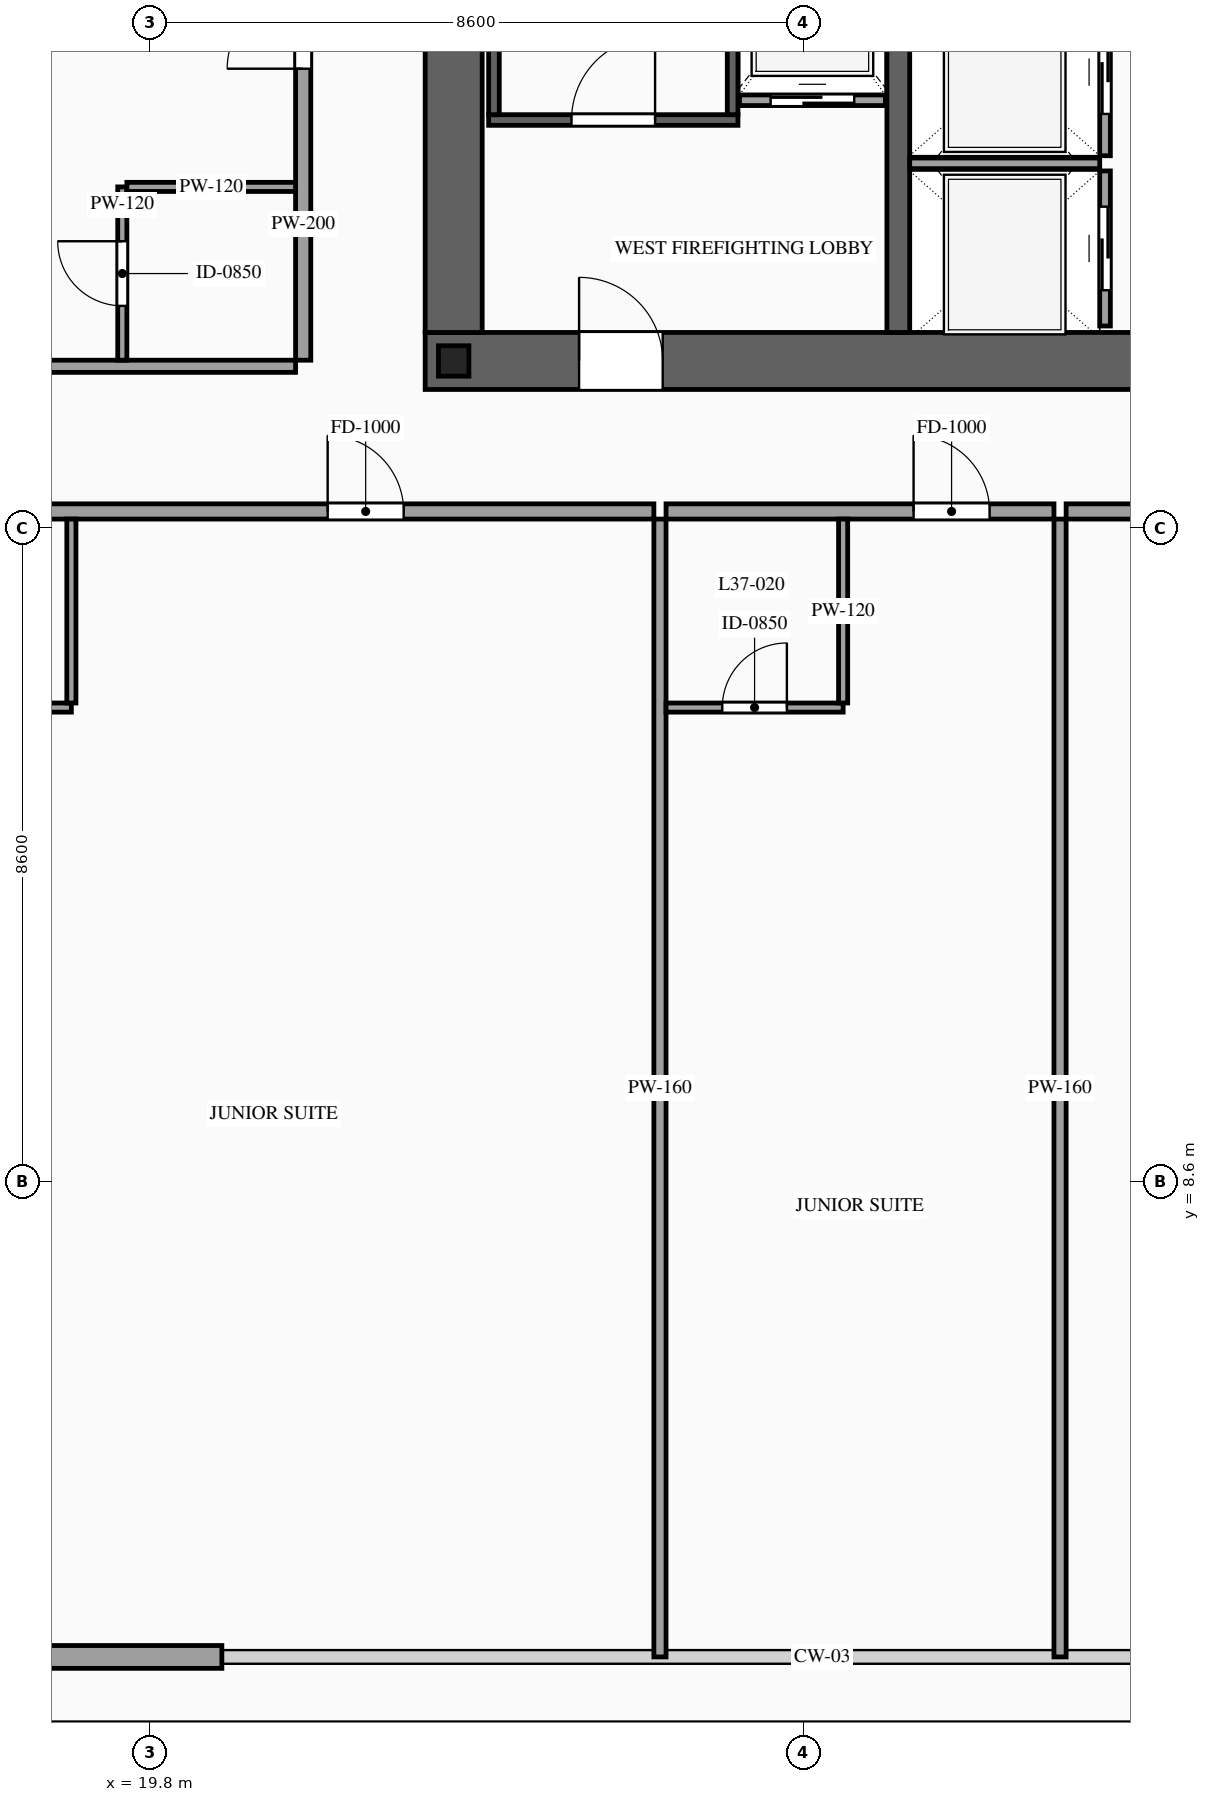
"""IFC4 building model, lengths in metres.
Left out: names, types, materials, properties, quantities, classifications, styles, units other than length and angle.
Written with IfcOpenShell. Run it as: python <this file> out.ifc"""

import sys

from ifc_helpers import new_model, si_unit, direction, frame, frame_2d, origin, origin_2d, place, context, subcontext, project, spatial, rectangle, i_section, extrude, source, transform, mapped, element, fill, save


model = new_model("IFC4")
c1 = context("Model", 3, precision=1e-05, world=origin(), true_north=direction((0.0, 1.0)))
c2 = subcontext(c1, "Body", "Model", "MODEL_VIEW")
j1 = project(units=[si_unit("LENGTHUNIT", "METRE"), si_unit("PLANEANGLEUNIT", "RADIAN")], contexts=[c1])
p1 = place(None, origin())
s1 = spatial("IfcSite", under=j1, at=p1, CompositionType="ELEMENT")
p2 = place(p1, origin())
s2 = spatial("IfcBuilding", under=s1, at=p2, CompositionType="ELEMENT")
p3 = place(p2, frame((0.0, 0.0, 141.6)))
s3 = spatial("IfcBuildingStorey", under=s2, at=p3, CompositionType="ELEMENT", Elevation=141.6)
p4 = place(p3, frame((23.425, 19.4, 0.0), z_axis=(0.0, 0.0, 1.0), x_axis=(1.0, 0.0, 0.0)))
e1 = element("IfcWall", 1, at=p4, inside=s3, PredefinedType="SHEAR", context=c2, shape_type="SweptSolid", body=[
    extrude(rectangle(XDim=27.15, YDim=0.75, at=frame_2d((13.575, 0.0))), origin(), (0.0, 0.0, 1.0), 3.6),
])
p5 = place(p4, frame((2.025, 0.0, 0.0)))
e2 = element("IfcOpeningElement", 2, at=p5, cuts=e1, PredefinedType="OPENING", context=c2, shape_type="SweptSolid", body=[
    extrude(rectangle(XDim=1.1, YDim=2.2, at=frame_2d((0.55, 1.1))), frame((0.0, 0.39, 0.0), z_axis=(0.0, -1.0, 0.0), x_axis=(1.0, 0.0, 0.0)), (0.0, 0.0, 1.0), 0.78),
])
p6 = place(p4, frame((9.925, 0.0, 0.0)))
e3 = element("IfcOpeningElement", 3, at=p6, cuts=e1, PredefinedType="OPENING", context=c2, shape_type="SweptSolid", body=[
    extrude(rectangle(XDim=1.1, YDim=2.2, at=frame_2d((0.55, 1.1))), frame((0.0, 0.39, 0.0), z_axis=(0.0, -1.0, 0.0), x_axis=(1.0, 0.0, 0.0)), (0.0, 0.0, 1.0), 0.78),
])
p7 = place(p4, frame((23.125, 0.0, 0.0)))
e4 = element("IfcOpeningElement", 4, at=p7, cuts=e1, PredefinedType="OPENING", context=c2, shape_type="SweptSolid", body=[
    extrude(rectangle(XDim=1.1, YDim=2.2, at=frame_2d((0.55, 1.1))), frame((0.0, 0.39, 0.0), z_axis=(0.0, -1.0, 0.0), x_axis=(1.0, 0.0, 0.0)), (0.0, 0.0, 1.0), 0.78),
])
p8 = place(p4, frame((19.745, 0.0, 0.0)))
e5 = element("IfcOpeningElement", 5, at=p8, cuts=e1, PredefinedType="OPENING", context=c2, shape_type="SweptSolid", body=[
    extrude(rectangle(XDim=0.9, YDim=2.15, at=frame_2d((0.45, 1.075))), frame((0.0, 0.39, 0.0), z_axis=(0.0, -1.0, 0.0), x_axis=(1.0, 0.0, 0.0)), (0.0, 0.0, 1.0), 0.78),
])
p9 = place(p4, frame((18.305, 0.0, 0.0)))
e6 = element("IfcOpeningElement", 6, at=p9, cuts=e1, PredefinedType="OPENING", context=c2, shape_type="SweptSolid", body=[
    extrude(rectangle(XDim=0.9, YDim=2.15, at=frame_2d((0.45, 1.075))), frame((0.0, 0.39, 0.0), z_axis=(0.0, -1.0, 0.0), x_axis=(1.0, 0.0, 0.0)), (0.0, 0.0, 1.0), 0.78),
])
m1 = source(origin(), c2, "Body", "SweptSolid", [
    extrude(rectangle(XDim=12.05, YDim=0.75, at=frame_2d((6.025, 0.0))), origin(), (0.0, 0.0, 1.0), 3.6),
])
p10 = place(p3, frame((23.8, 19.775, 0.0), z_axis=(0.0, 0.0, 1.0), x_axis=(0.0, 1.0, 0.0)))
e7 = element("IfcWall", 7, at=p10, inside=s3, PredefinedType="SHEAR", context=c2, shape_type="MappedRepresentation", body=[
    mapped(m1, transform((0.0, 0.0, 0.0), scale=1.0)),
])
m2 = source(origin(), c2, "Body", "SweptSolid", [
    extrude(rectangle(XDim=12.05, YDim=0.3, at=frame_2d((6.025, 0.0))), origin(), (0.0, 0.0, 1.0), 3.6),
])
p11 = place(p3, frame((29.65, 19.775, 0.0), z_axis=(0.0, 0.0, 1.0), x_axis=(0.0, 1.0, 0.0)))
e8 = element("IfcWall", 8, at=p11, inside=s3, PredefinedType="SOLIDWALL", context=c2, shape_type="MappedRepresentation", body=[
    mapped(m2, transform((0.0, 0.0, 0.0), scale=1.0)),
])
m3 = source(origin(), c2, "Body", "SweptSolid", [
    extrude(i_section(OverallWidth=0.4, OverallDepth=0.4, WebThickness=0.013, FlangeThickness=0.021, at=origin_2d()), origin(), (0.0, 0.0, 1.0), 3.6),
])
p12 = place(p3, frame((23.8, 19.4, 0.0), z_axis=(0.0, 0.0, 1.0), x_axis=(1.0, 0.0, 0.0)))
e9 = element("IfcColumn", 9, at=p12, inside=s3, PredefinedType="COLUMN", context=c2, shape_type="MappedRepresentation", body=[
    mapped(m3, transform((0.0, 0.0, 0.0), scale=1.0)),
])
m4 = source(origin(), c2, "Body", "SweptSolid", [
    extrude(rectangle(XDim=2.95, YDim=0.3, at=frame_2d((1.475, 0.0))), origin(), (0.0, 0.0, 1.0), 2.775),
])
p13 = place(p3, frame((17.8, 2.35, 0.0), z_axis=(0.0, 0.0, 1.0), x_axis=(1.0, 0.0, 0.0)))
e10 = element("IfcWall", 10, at=p13, inside=s3, PredefinedType="SOLIDWALL", context=c2, shape_type="MappedRepresentation", body=[
    mapped(m4, transform((0.0, 0.0, 0.0), scale=1.0)),
])
p14 = place(p3, frame((27.56, 22.83, 0.0), z_axis=(0.0, 0.0, 1.0), x_axis=(1.0, 0.0, 0.0)))
e11 = element("IfcWall", 11, at=p14, inside=s3, PredefinedType="SOLIDWALL", context=c2, shape_type="SweptSolid", body=[
    extrude(rectangle(XDim=1.92, YDim=0.14, at=frame_2d((0.96, 0.0))), origin(), (0.0, 0.0, 1.0), 3.38),
])
p15 = place(p14, frame((0.41, 0.0, 0.0)))
e12 = element("IfcOpeningElement", 12, at=p15, cuts=e11, PredefinedType="OPENING", context=c2, shape_type="SweptSolid", body=[
    extrude(rectangle(XDim=1.1, YDim=2.2, at=frame_2d((0.55, 1.1))), frame((0.0, 0.085, 0.0), z_axis=(0.0, -1.0, 0.0), x_axis=(1.0, 0.0, 0.0)), (0.0, 0.0, 1.0), 0.17),
])
p16 = place(p3, frame((32.37, 19.86, 0.0), z_axis=(0.0, 0.0, 1.0), x_axis=(0.0, 1.0, 0.0)))
e13 = element("IfcWall", 13, at=p16, inside=s3, PredefinedType="SOLIDWALL", context=c2, shape_type="SweptSolid", body=[
    extrude(rectangle(XDim=2.04, YDim=0.14, at=frame_2d((1.02, 0.0))), origin(), (0.0, 0.0, 1.0), 3.38),
])
p17 = place(p16, frame((0.47, 0.0, 0.0)))
e14 = element("IfcOpeningElement", 14, at=p17, cuts=e13, PredefinedType="OPENING", context=c2, shape_type="SweptSolid", body=[
    extrude(rectangle(XDim=1.1, YDim=2.2, at=frame_2d((0.55, 1.1))), frame((0.0, 0.085, 0.0), z_axis=(0.0, -1.0, 0.0), x_axis=(1.0, 0.0, 0.0)), (0.0, 0.0, 1.0), 0.17),
])
m5 = source(origin(), c2, "Body", "SweptSolid", [
    extrude(rectangle(XDim=2.5, YDim=0.14, at=frame_2d((1.25, 0.0))), origin(), (0.0, 0.0, 1.0), 3.38),
])
p18 = place(p3, frame((29.8, 22.0, 0.0), z_axis=(0.0, 0.0, 1.0), x_axis=(1.0, 0.0, 0.0)))
e15 = element("IfcWall", 15, at=p18, inside=s3, PredefinedType="SOLIDWALL", context=c2, shape_type="MappedRepresentation", body=[
    mapped(m5, transform((0.0, 0.0, 0.0), scale=1.0)),
])
p19 = place(p3, frame((32.37, 22.1, 0.0), z_axis=(0.0, 0.0, 1.0), x_axis=(0.0, 1.0, 0.0)))
e16 = element("IfcWall", 16, at=p19, inside=s3, PredefinedType="SOLIDWALL", context=c2, shape_type="SweptSolid", body=[
    extrude(rectangle(XDim=2.2, YDim=0.14, at=frame_2d((1.1, 0.0))), origin(), (0.0, 0.0, 1.0), 3.38),
])
p20 = place(p19, frame((0.55, 0.0, 0.0)))
e17 = element("IfcOpeningElement", 17, at=p20, cuts=e16, PredefinedType="OPENING", context=c2, shape_type="SweptSolid", body=[
    extrude(rectangle(XDim=1.1, YDim=2.2, at=frame_2d((0.55, 1.1))), frame((0.0, 0.085, 0.0), z_axis=(0.0, -1.0, 0.0), x_axis=(1.0, 0.0, 0.0)), (0.0, 0.0, 1.0), 0.17),
])
p21 = place(p3, frame((24.26, 22.57, 0.0), z_axis=(0.0, 0.0, 1.0), x_axis=(1.0, 0.0, 0.0)))
e18 = element("IfcWall", 18, at=p21, inside=s3, PredefinedType="SOLIDWALL", context=c2, shape_type="SweptSolid", body=[
    extrude(rectangle(XDim=3.28, YDim=0.14, at=frame_2d((1.64, 0.0))), origin(), (0.0, 0.0, 1.0), 3.38),
])
p22 = place(p21, frame((1.09, 0.0, 0.0)))
e19 = element("IfcOpeningElement", 19, at=p22, cuts=e18, PredefinedType="OPENING", context=c2, shape_type="SweptSolid", body=[
    extrude(rectangle(XDim=1.1, YDim=2.2, at=frame_2d((0.55, 1.1))), frame((0.0, 0.085, 0.0), z_axis=(0.0, -1.0, 0.0), x_axis=(1.0, 0.0, 0.0)), (0.0, 0.0, 1.0), 0.17),
])
m6 = source(origin(), c2, "Body", "SweptSolid", [
    extrude(rectangle(XDim=8.94, YDim=0.14, at=frame_2d((4.47, 0.0))), origin(), (0.0, 0.0, 1.0), 3.38),
])
for number, where, z_axis, x_axis in (
    (20, (24.33, 22.64, 0.0), (0.0, 0.0, 1.0), (0.0, 1.0, 0.0)),
    (21, (27.47, 22.64, 0.0), (0.0, 0.0, 1.0), (0.0, 1.0, 0.0)),
):
    element("IfcWall", number, at=place(p3, frame(where, z_axis=z_axis, x_axis=x_axis)), inside=s3, PredefinedType="SOLIDWALL", context=c2, shape_type="MappedRepresentation", body=[
        mapped(m6, transform((0.0, 0.0, 0.0), scale=1.0)),
    ])
p23 = place(p3, frame((16.44, 17.42, 0.0), z_axis=(0.0, 0.0, 1.0), x_axis=(1.0, 0.0, 0.0)))
e22 = element("IfcWall", 22, at=p23, inside=s3, PredefinedType="PARTITIONING", context=c2, shape_type="SweptSolid", body=[
    extrude(rectangle(XDim=9.994, YDim=0.2, at=frame_2d((4.997, 0.0))), origin(), (0.0, 0.0, 1.0), 3.38),
])
p24 = place(p23, frame((5.702, 0.0, 0.0)))
e23 = element("IfcOpeningElement", 23, at=p24, cuts=e22, PredefinedType="OPENING", context=c2, shape_type="SweptSolid", body=[
    extrude(rectangle(XDim=1.0, YDim=2.2, at=frame_2d((0.5, 1.1))), frame((0.0, 0.115, 0.0), z_axis=(0.0, -1.0, 0.0), x_axis=(1.0, 0.0, 0.0)), (0.0, 0.0, 1.0), 0.23),
])
m7 = source(origin(), c2, "Body", "SweptSolid", [
    extrude(rectangle(XDim=14.97, YDim=0.16, at=frame_2d((7.485, 0.0))), origin(), (0.0, 0.0, 1.0), 3.38),
])
p25 = place(p3, frame((26.514, 2.35, 0.0), z_axis=(0.0, 0.0, 1.0), x_axis=(0.0, 1.0, 0.0)))
e24 = element("IfcWall", 24, at=p25, inside=s3, PredefinedType="PARTITIONING", context=c2, shape_type="MappedRepresentation", body=[
    mapped(m7, transform((0.0, 0.0, 0.0), scale=1.0)),
])
p26 = place(p3, frame((16.44, 14.84, 0.0), z_axis=(0.0, 0.0, 1.0), x_axis=(1.0, 0.0, 0.0)))
e25 = element("IfcWall", 25, at=p26, inside=s3, PredefinedType="PARTITIONING", context=c2, shape_type="SweptSolid", body=[
    extrude(rectangle(XDim=2.33, YDim=0.12, at=frame_2d((1.165, 0.0))), origin(), (0.0, 0.0, 1.0), 3.38),
])
p27 = place(p26, frame((0.74, 0.0, 0.0)))
e26 = element("IfcOpeningElement", 26, at=p27, cuts=e25, PredefinedType="OPENING", context=c2, shape_type="SweptSolid", body=[
    extrude(rectangle(XDim=0.85, YDim=2.1, at=frame_2d((0.425, 1.05))), frame((0.0, 0.075, 0.0), z_axis=(0.0, -1.0, 0.0), x_axis=(1.0, 0.0, 0.0)), (0.0, 0.0, 1.0), 0.15),
])
m8 = source(origin(), c2, "Body", "SweptSolid", [
    extrude(rectangle(XDim=2.42, YDim=0.12, at=frame_2d((1.21, 0.0))), origin(), (0.0, 0.0, 1.0), 3.38),
])
p28 = place(p3, frame((18.77, 14.9, 0.0), z_axis=(0.0, 0.0, 1.0), x_axis=(0.0, 1.0, 0.0)))
e27 = element("IfcWall", 27, at=p28, inside=s3, PredefinedType="PARTITIONING", context=c2, shape_type="MappedRepresentation", body=[
    mapped(m8, transform((0.0, 0.0, 0.0), scale=1.0)),
])
p29 = place(p3, frame((26.594, 17.42, 0.0), z_axis=(0.0, 0.0, 1.0), x_axis=(1.0, 0.0, 0.0)))
e28 = element("IfcWall", 28, at=p29, inside=s3, PredefinedType="PARTITIONING", context=c2, shape_type="SweptSolid", body=[
    extrude(rectangle(XDim=5.104, YDim=0.2, at=frame_2d((2.552, 0.0))), origin(), (0.0, 0.0, 1.0), 3.38),
])
p30 = place(p29, frame((3.257, 0.0, 0.0)))
e29 = element("IfcOpeningElement", 29, at=p30, cuts=e28, PredefinedType="OPENING", context=c2, shape_type="SweptSolid", body=[
    extrude(rectangle(XDim=1.0, YDim=2.2, at=frame_2d((0.5, 1.1))), frame((0.0, 0.115, 0.0), z_axis=(0.0, -1.0, 0.0), x_axis=(1.0, 0.0, 0.0)), (0.0, 0.0, 1.0), 0.23),
])
p31 = place(p3, frame((31.778, 2.35, 0.0), z_axis=(0.0, 0.0, 1.0), x_axis=(0.0, 1.0, 0.0)))
e30 = element("IfcWall", 30, at=p31, inside=s3, PredefinedType="PARTITIONING", context=c2, shape_type="MappedRepresentation", body=[
    mapped(m7, transform((0.0, 0.0, 0.0), scale=1.0)),
])
p32 = place(p3, frame((26.594, 14.84, 0.0), z_axis=(0.0, 0.0, 1.0), x_axis=(1.0, 0.0, 0.0)))
e31 = element("IfcWall", 31, at=p32, inside=s3, PredefinedType="PARTITIONING", context=c2, shape_type="SweptSolid", body=[
    extrude(rectangle(XDim=2.33, YDim=0.12, at=frame_2d((1.165, 0.0))), origin(), (0.0, 0.0, 1.0), 3.38),
])
p33 = place(p32, frame((0.74, 0.0, 0.0)))
e32 = element("IfcOpeningElement", 32, at=p33, cuts=e31, PredefinedType="OPENING", context=c2, shape_type="SweptSolid", body=[
    extrude(rectangle(XDim=0.85, YDim=2.1, at=frame_2d((0.425, 1.05))), frame((0.0, 0.075, 0.0), z_axis=(0.0, -1.0, 0.0), x_axis=(1.0, 0.0, 0.0)), (0.0, 0.0, 1.0), 0.15),
])
p34 = place(p3, frame((28.924, 14.9, 0.0), z_axis=(0.0, 0.0, 1.0), x_axis=(0.0, 1.0, 0.0)))
e33 = element("IfcWall", 33, at=p34, inside=s3, PredefinedType="PARTITIONING", context=c2, shape_type="MappedRepresentation", body=[
    mapped(m8, transform((0.0, 0.0, 0.0), scale=1.0)),
])
p35 = place(p3, frame((31.858, 17.42, 0.0), z_axis=(0.0, 0.0, 1.0), x_axis=(1.0, 0.0, 0.0)))
e34 = element("IfcWall", 34, at=p35, inside=s3, PredefinedType="PARTITIONING", context=c2, shape_type="SweptSolid", body=[
    extrude(rectangle(XDim=11.024, YDim=0.2, at=frame_2d((5.512, 0.0))), origin(), (0.0, 0.0, 1.0), 3.38),
])
p36 = place(p35, frame((5.012, 0.0, 0.0)))
e35 = element("IfcOpeningElement", 35, at=p36, cuts=e34, PredefinedType="OPENING", context=c2, shape_type="SweptSolid", body=[
    extrude(rectangle(XDim=1.0, YDim=2.2, at=frame_2d((0.5, 1.1))), frame((0.0, 0.115, 0.0), z_axis=(0.0, -1.0, 0.0), x_axis=(1.0, 0.0, 0.0)), (0.0, 0.0, 1.0), 0.23),
])
p37 = place(p3, frame((21.82, 19.41, 0.0), z_axis=(0.0, 0.0, 1.0), x_axis=(0.0, 1.0, 0.0)))
e36 = element("IfcWall", 36, at=p37, inside=s3, PredefinedType="PARTITIONING", context=c2, shape_type="SweptSolid", body=[
    extrude(rectangle(XDim=6.31, YDim=0.2, at=frame_2d((3.155, 0.0))), origin(), (0.0, 0.0, 1.0), 3.38),
])
p38 = place(p37, frame((3.835, 0.0, 0.0)))
e37 = element("IfcOpeningElement", 37, at=p38, cuts=e36, PredefinedType="OPENING", context=c2, shape_type="SweptSolid", body=[
    extrude(rectangle(XDim=1.0, YDim=2.2, at=frame_2d((0.5, 1.1))), frame((0.0, 0.115, 0.0), z_axis=(0.0, -1.0, 0.0), x_axis=(1.0, 0.0, 0.0)), (0.0, 0.0, 1.0), 0.23),
])
m9 = source(origin(), c2, "Body", "SweptSolid", [
    extrude(rectangle(XDim=8.17, YDim=0.16, at=frame_2d((4.085, 0.0))), origin(), (0.0, 0.0, 1.0), 2.875),
])
p39 = place(p3, frame((13.55, 19.33, 0.0), z_axis=(0.0, 0.0, 1.0), x_axis=(1.0, 0.0, 0.0)))
e38 = element("IfcWall", 38, at=p39, inside=s3, PredefinedType="PARTITIONING", context=c2, shape_type="MappedRepresentation", body=[
    mapped(m9, transform((0.0, 0.0, 0.0), scale=1.0)),
])
p40 = place(p3, frame((19.44, 19.41, 0.0), z_axis=(0.0, 0.0, 1.0), x_axis=(0.0, 1.0, 0.0)))
e39 = element("IfcWall", 39, at=p40, inside=s3, PredefinedType="PARTITIONING", context=c2, shape_type="SweptSolid", body=[
    extrude(rectangle(XDim=2.28, YDim=0.12, at=frame_2d((1.14, 0.0))), origin(), (0.0, 0.0, 1.0), 3.38),
])
p41 = place(p40, frame((0.715, 0.0, 0.0)))
e40 = element("IfcOpeningElement", 40, at=p41, cuts=e39, PredefinedType="OPENING", context=c2, shape_type="SweptSolid", body=[
    extrude(rectangle(XDim=0.85, YDim=2.1, at=frame_2d((0.425, 1.05))), frame((0.0, 0.075, 0.0), z_axis=(0.0, -1.0, 0.0), x_axis=(1.0, 0.0, 0.0)), (0.0, 0.0, 1.0), 0.15),
])
m10 = source(origin(), c2, "Body", "SweptSolid", [
    extrude(rectangle(XDim=2.22, YDim=0.12, at=frame_2d((1.11, 0.0))), origin(), (0.0, 0.0, 1.0), 3.38),
])
p42 = place(p3, frame((19.5, 21.69, 0.0), z_axis=(0.0, 0.0, 1.0), x_axis=(1.0, 0.0, 0.0)))
e41 = element("IfcWall", 41, at=p42, inside=s3, PredefinedType="PARTITIONING", context=c2, shape_type="MappedRepresentation", body=[
    mapped(m10, transform((0.0, 0.0, 0.0), scale=1.0)),
])
m11 = source(origin(), c2, "Body", "SweptSolid", [
    extrude(rectangle(XDim=1.1, YDim=2.2, at=frame_2d((0.55, 1.1))), frame((0.0, 0.025, 0.0), z_axis=(0.0, -1.0, 0.0), x_axis=(1.0, 0.0, 0.0)), (0.0, 0.0, 1.0), 0.05),
])
p43 = place(p15, origin())
e42 = element("IfcDoor", 42, at=p43, inside=s3, OperationType="SLIDING_TO_LEFT", PredefinedType="DOOR", context=c2, shape_type="MappedRepresentation", body=[
    mapped(m11, transform((0.0, 0.0, 0.0), scale=1.0)),
])
fill(e12, e42)
p44 = place(p17, origin())
e43 = element("IfcDoor", 43, at=p44, inside=s3, OperationType="SLIDING_TO_LEFT", PredefinedType="DOOR", context=c2, shape_type="MappedRepresentation", body=[
    mapped(m11, transform((0.0, 0.0, 0.0), scale=1.0)),
])
fill(e14, e43)
p45 = place(p20, origin())
e44 = element("IfcDoor", 44, at=p45, inside=s3, OperationType="SLIDING_TO_RIGHT", PredefinedType="DOOR", context=c2, shape_type="MappedRepresentation", body=[
    mapped(m11, transform((0.0, 0.0, 0.0), scale=1.0)),
])
fill(e17, e44)
m12 = source(origin(), c2, "Body", "SweptSolid", [
    extrude(rectangle(XDim=1.1, YDim=2.2, at=frame_2d((0.55, 1.1))), frame((0.0, 0.025, 0.0), z_axis=(0.0, -1.0, 0.0), x_axis=(1.0, 0.0, 0.0)), (0.0, 0.0, 1.0), 0.05),
])
p46 = place(p22, origin())
e45 = element("IfcDoor", 45, at=p46, inside=s3, OperationType="SINGLE_SWING_RIGHT", PredefinedType="DOOR", context=c2, shape_type="MappedRepresentation", body=[
    mapped(m12, transform((0.0, 0.0, 0.0), scale=1.0)),
])
fill(e19, e45)
p47 = place(p5, origin())
e46 = element("IfcDoor", 46, at=p47, inside=s3, OperationType="SINGLE_SWING_LEFT", PredefinedType="DOOR", context=c2, shape_type="MappedRepresentation", body=[
    mapped(m12, transform((0.0, 0.0, 0.0), scale=1.0)),
])
fill(e2, e46)
m13 = source(origin(), c2, "Body", "SweptSolid", [
    extrude(rectangle(XDim=1.0, YDim=2.2, at=frame_2d((0.5, 1.1))), frame((0.0, 0.025, 0.0), z_axis=(0.0, -1.0, 0.0), x_axis=(1.0, 0.0, 0.0)), (0.0, 0.0, 1.0), 0.05),
])
p48 = place(p24, origin())
e47 = element("IfcDoor", 47, at=p48, inside=s3, OperationType="SINGLE_SWING_LEFT", PredefinedType="DOOR", context=c2, shape_type="MappedRepresentation", body=[
    mapped(m13, transform((0.0, 0.0, 0.0), scale=1.0)),
])
fill(e23, e47)
p49 = place(p30, origin())
e48 = element("IfcDoor", 48, at=p49, inside=s3, OperationType="SINGLE_SWING_LEFT", PredefinedType="DOOR", context=c2, shape_type="MappedRepresentation", body=[
    mapped(m13, transform((0.0, 0.0, 0.0), scale=1.0)),
])
fill(e29, e48)
m14 = source(origin(), c2, "Body", "SweptSolid", [
    extrude(rectangle(XDim=0.85, YDim=2.1, at=frame_2d((0.425, 1.05))), frame((0.0, 0.025, 0.0), z_axis=(0.0, -1.0, 0.0), x_axis=(1.0, 0.0, 0.0)), (0.0, 0.0, 1.0), 0.05),
])
p50 = place(p33, origin())
e49 = element("IfcDoor", 49, at=p50, inside=s3, OperationType="SINGLE_SWING_RIGHT", PredefinedType="DOOR", context=c2, shape_type="MappedRepresentation", body=[
    mapped(m14, transform((0.0, 0.0, 0.0), scale=1.0)),
])
fill(e32, e49)
p51 = place(p38, origin())
e50 = element("IfcDoor", 50, at=p51, inside=s3, OperationType="SINGLE_SWING_LEFT", PredefinedType="DOOR", context=c2, shape_type="MappedRepresentation", body=[
    mapped(m13, transform((0.0, 0.0, 0.0), scale=1.0)),
])
fill(e37, e50)
p52 = place(p41, origin())
e51 = element("IfcDoor", 51, at=p52, inside=s3, OperationType="SINGLE_SWING_RIGHT", PredefinedType="DOOR", context=c2, shape_type="MappedRepresentation", body=[
    mapped(m14, transform((0.0, 0.0, 0.0), scale=1.0)),
])
fill(e40, e51)
save(model, sys.argv[1])
